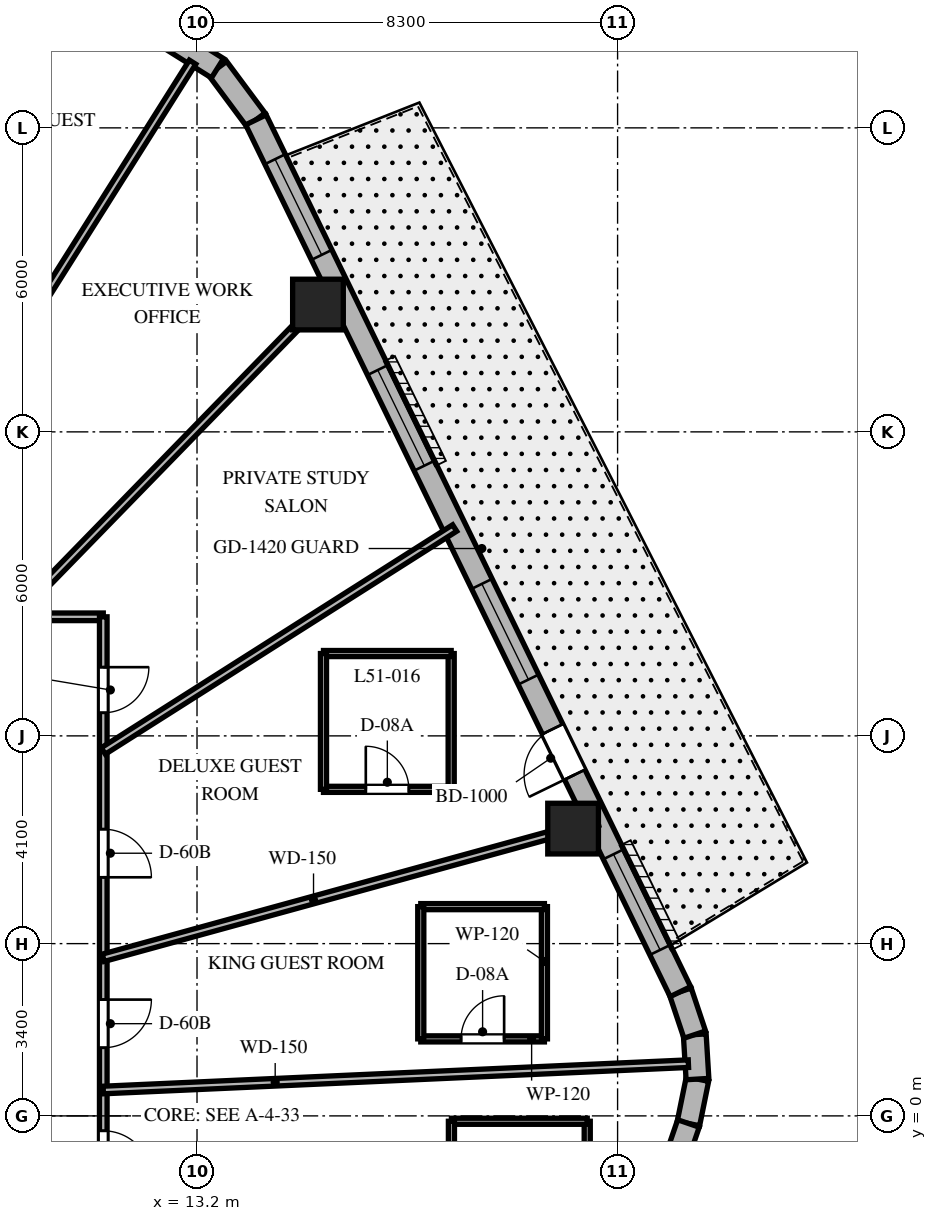
"""IFC4 building model, lengths in metres.
Left out: names, types, materials, properties, quantities, classifications, styles, units other than length and angle.
Written with IfcOpenShell. Run it as: python <this file> out.ifc"""

import sys

from ifc_helpers import new_model, si_unit, direction, frame, frame_2d, origin, origin_2d, place, context, subcontext, project, spatial, rectangle, extrude, element, fill, save


model = new_model("IFC4")
c1 = context("Model", 3, precision=1e-05, world=origin(), true_north=direction((0.0, 1.0)))
c2 = subcontext(c1, "Body", "Model", "MODEL_VIEW")
j1 = project(units=[si_unit("LENGTHUNIT", "METRE"), si_unit("PLANEANGLEUNIT", "RADIAN")], contexts=[c1])
p1 = place(None, origin())
s1 = spatial("IfcSite", under=j1, at=p1, CompositionType="ELEMENT")
p2 = place(p1, origin())
s2 = spatial("IfcBuilding", under=s1, at=p2, CompositionType="ELEMENT")
p3 = place(p2, frame((0.0, 0.0, 206.5)))
s3 = spatial("IfcBuildingStorey", under=s2, at=p3, CompositionType="ELEMENT", Elevation=206.5)
for number, where, z_axis, x_axis in (
    (1, (20.622, 5.67, 0.0), (0.0, 0.0, 1.0), (1.0, 0.0, 0.0)),
    (2, (15.587, 16.013, 0.0), (0.0, 0.0, 1.0), (1.0, 0.0, 0.0)),
):
    element("IfcColumn", number, at=place(p3, frame(where, z_axis=z_axis, x_axis=x_axis)), inside=s3, PredefinedType="COLUMN", context=c2, shape_type="SweptSolid", body=[
        extrude(rectangle(XDim=1.0, YDim=1.0, at=origin_2d()), origin(), (0.0, 0.0, 1.0), 3.8),
    ])
p4 = place(p3, frame((22.898, -0.15, 0.0), z_axis=(0.0, 0.0, 1.0), x_axis=(0.199055826889, 0.979988151858, 0.0)))
e3 = element("IfcWall", 3, at=p4, inside=s3, PredefinedType="SOLIDWALL", context=c2, shape_type="SweptSolid", body=[
    extrude(rectangle(XDim=0.894, YDim=0.45, at=frame_2d((0.447, 0.0))), origin(), (0.0, 0.0, 1.0), 3.5),
])
p5 = place(p3, frame((23.076, 0.727, 0.0), z_axis=(0.0, 0.0, 1.0), x_axis=(-0.060805222108, 0.998149650586, 0.0)))
e4 = element("IfcWall", 4, at=p5, inside=s3, PredefinedType="SOLIDWALL", context=c2, shape_type="SweptSolid", body=[
    extrude(rectangle(XDim=0.879, YDim=0.45, at=frame_2d((0.44, 0.0))), origin(), (0.0, 0.0, 1.0), 3.5),
])
p6 = place(p3, frame((23.023, 1.604, 0.0), z_axis=(0.0, 0.0, 1.0), x_axis=(-0.316801227695, 0.948491951537, 0.0)))
e5 = element("IfcWall", 5, at=p6, inside=s3, PredefinedType="SOLIDWALL", context=c2, shape_type="SweptSolid", body=[
    extrude(rectangle(XDim=0.894, YDim=0.45, at=frame_2d((0.447, 0.0))), origin(), (0.0, 0.0, 1.0), 3.5),
])
p7 = place(p3, frame((14.362, 19.658, 0.0), z_axis=(0.0, 0.0, 1.0), x_axis=(-0.596642462792, 0.80250717853, 0.0)))
e6 = element("IfcWall", 6, at=p7, inside=s3, PredefinedType="SOLIDWALL", context=c2, shape_type="SweptSolid", body=[
    extrude(rectangle(XDim=1.27, YDim=0.45, at=frame_2d((0.635, 0.0))), origin(), (0.0, 0.0, 1.0), 3.5),
])
p8 = place(p3, frame((13.604, 20.678, 0.0), z_axis=(0.0, 0.0, 1.0), x_axis=(-0.847910404124, 0.53013955387, 0.0)))
e7 = element("IfcWall", 7, at=p8, inside=s3, PredefinedType="SOLIDWALL", context=c2, shape_type="SweptSolid", body=[
    extrude(rectangle(XDim=1.249, YDim=0.45, at=frame_2d((0.624, 0.0))), origin(), (0.0, 0.0, 1.0), 3.5),
])
p9 = place(p3, frame((16.324, -19.275, 0.0), z_axis=(0.0, 0.0, 1.0), x_axis=(0.325083142304, 0.945685439557, 0.0)))
e8 = element("IfcWall", 8, at=p9, inside=s3, PredefinedType="SOLIDWALL", context=c2, shape_type="SweptSolid", body=[
    extrude(rectangle(XDim=20.224, YDim=0.45, at=frame_2d((10.112, 0.0))), origin(), (0.0, 0.0, 1.0), 3.5),
])
p10 = place(p9, frame((5.062, 0.0, 0.0)))
e9 = element("IfcOpeningElement", 9, at=p10, cuts=e8, PredefinedType="OPENING", context=c2, shape_type="SweptSolid", body=[
    extrude(rectangle(XDim=0.95, YDim=2.15, at=frame_2d((0.475, 1.075))), frame((0.0, 0.235, 0.0), z_axis=(0.0, -1.0, 0.0), x_axis=(1.0, 0.0, 0.0)), (0.0, 0.0, 1.0), 0.47),
])
p11 = place(p9, frame((1.253, 0.0, 0.8)))
e10 = element("IfcOpeningElement", 10, at=p11, cuts=e8, PredefinedType="OPENING", context=c2, shape_type="SweptSolid", body=[
    extrude(rectangle(XDim=1.5, YDim=1.8, at=frame_2d((0.75, 0.9))), frame((0.0, 0.235, 0.0), z_axis=(0.0, -1.0, 0.0), x_axis=(1.0, 0.0, 0.0)), (0.0, 0.0, 1.0), 0.47),
])
p12 = place(p9, frame((9.309, 0.0, 0.8)))
e11 = element("IfcOpeningElement", 11, at=p12, cuts=e8, PredefinedType="OPENING", context=c2, shape_type="SweptSolid", body=[
    extrude(rectangle(XDim=1.5, YDim=1.8, at=frame_2d((0.75, 0.9))), frame((0.0, 0.235, 0.0), z_axis=(0.0, -1.0, 0.0), x_axis=(1.0, 0.0, 0.0)), (0.0, 0.0, 1.0), 0.47),
])
p13 = place(p9, frame((17.418, 0.0, 0.8)))
e12 = element("IfcOpeningElement", 12, at=p13, cuts=e8, PredefinedType="OPENING", context=c2, shape_type="SweptSolid", body=[
    extrude(rectangle(XDim=1.5, YDim=1.8, at=frame_2d((0.75, 0.9))), frame((0.0, 0.235, 0.0), z_axis=(0.0, -1.0, 0.0), x_axis=(1.0, 0.0, 0.0)), (0.0, 0.0, 1.0), 0.47),
])
p14 = place(p3, frame((22.74, 2.452, 0.0), z_axis=(0.0, 0.0, 1.0), x_axis=(-0.437753424814, 0.899095066755, 0.0)))
e13 = element("IfcWall", 13, at=p14, inside=s3, PredefinedType="SOLIDWALL", context=c2, shape_type="SweptSolid", body=[
    extrude(rectangle(XDim=19.137, YDim=0.45, at=frame_2d((9.569, 0.0))), origin(), (0.0, 0.0, 1.0), 3.5),
])
p15 = place(p14, frame((4.763, 0.0, 0.0)))
e14 = element("IfcOpeningElement", 14, at=p15, cuts=e13, PredefinedType="OPENING", context=c2, shape_type="SweptSolid", body=[
    extrude(rectangle(XDim=1.0, YDim=2.15, at=frame_2d((0.5, 1.075))), frame((0.0, 0.235, 0.0), z_axis=(0.0, -1.0, 0.0), x_axis=(1.0, 0.0, 0.0)), (0.0, 0.0, 1.0), 0.47),
])
p16 = place(p14, frame((0.916, 0.0, 0.8)))
e15 = element("IfcOpeningElement", 15, at=p16, cuts=e13, PredefinedType="OPENING", context=c2, shape_type="SweptSolid", body=[
    extrude(rectangle(XDim=2.1, YDim=1.85, at=frame_2d((1.05, 0.925))), frame((0.0, 0.235, 0.0), z_axis=(0.0, -1.0, 0.0), x_axis=(1.0, 0.0, 0.0)), (0.0, 0.0, 1.0), 0.47),
])
p17 = place(p14, frame((6.851, 0.0, 0.8)))
e16 = element("IfcOpeningElement", 16, at=p17, cuts=e13, PredefinedType="OPENING", context=c2, shape_type="SweptSolid", body=[
    extrude(rectangle(XDim=2.1, YDim=1.85, at=frame_2d((1.05, 0.925))), frame((0.0, 0.235, 0.0), z_axis=(0.0, -1.0, 0.0), x_axis=(1.0, 0.0, 0.0)), (0.0, 0.0, 1.0), 0.47),
])
p18 = place(p14, frame((11.545, 0.0, 0.8)))
e17 = element("IfcOpeningElement", 17, at=p18, cuts=e13, PredefinedType="OPENING", context=c2, shape_type="SweptSolid", body=[
    extrude(rectangle(XDim=2.1, YDim=1.85, at=frame_2d((1.05, 0.925))), frame((0.0, 0.235, 0.0), z_axis=(0.0, -1.0, 0.0), x_axis=(1.0, 0.0, 0.0)), (0.0, 0.0, 1.0), 0.47),
])
p19 = place(p14, frame((16.173, 0.0, 0.8)))
e18 = element("IfcOpeningElement", 18, at=p19, cuts=e13, PredefinedType="OPENING", context=c2, shape_type="SweptSolid", body=[
    extrude(rectangle(XDim=2.1, YDim=1.85, at=frame_2d((1.05, 0.925))), frame((0.0, 0.235, 0.0), z_axis=(0.0, -1.0, 0.0), x_axis=(1.0, 0.0, 0.0)), (0.0, 0.0, 1.0), 0.47),
])
p20 = place(p3, frame((0.92, 9.85, 0.0), z_axis=(0.0, 0.0, 1.0), x_axis=(1.0, 0.0, 0.0)))
e19 = element("IfcWall", 19, at=p20, inside=s3, PredefinedType="PARTITIONING", context=c2, shape_type="SweptSolid", body=[
    extrude(rectangle(XDim=10.43, YDim=0.15, at=frame_2d((5.215, 0.0))), origin(), (0.0, 0.0, 1.0), 2.99),
])
p21 = place(p20, frame((6.577, 0.0, 0.0)))
e20 = element("IfcOpeningElement", 20, at=p21, cuts=e19, PredefinedType="OPENING", context=c2, shape_type="SweptSolid", body=[
    extrude(rectangle(XDim=0.9, YDim=2.03, at=frame_2d((0.45, 1.015))), frame((0.0, 0.085, 0.0), z_axis=(0.0, -1.0, 0.0), x_axis=(1.0, 0.0, 0.0)), (0.0, 0.0, 1.0), 0.17),
])
p22 = place(p20, frame((3.234, 0.0, 0.0)))
e21 = element("IfcOpeningElement", 21, at=p22, cuts=e19, PredefinedType="OPENING", context=c2, shape_type="SweptSolid", body=[
    extrude(rectangle(XDim=0.95, YDim=2.03, at=frame_2d((0.475, 1.015))), frame((0.0, 0.085, 0.0), z_axis=(0.0, -1.0, 0.0), x_axis=(1.0, 0.0, 0.0)), (0.0, 0.0, 1.0), 0.17),
])
p23 = place(p3, frame((11.35, 9.85, 0.0), z_axis=(0.0, 0.0, 1.0), x_axis=(0.0, -1.0, 0.0)))
e22 = element("IfcWall", 22, at=p23, inside=s3, PredefinedType="PARTITIONING", context=c2, shape_type="SweptSolid", body=[
    extrude(rectangle(XDim=12.4, YDim=0.15, at=frame_2d((6.2, 0.0))), origin(), (0.0, 0.0, 1.0), 2.99),
])
p24 = place(p23, frame((7.555, 0.0, 0.0)))
e23 = element("IfcOpeningElement", 23, at=p24, cuts=e22, PredefinedType="OPENING", context=c2, shape_type="SweptSolid", body=[
    extrude(rectangle(XDim=0.95, YDim=2.03, at=frame_2d((0.475, 1.015))), frame((0.0, 0.085, 0.0), z_axis=(0.0, -1.0, 0.0), x_axis=(1.0, 0.0, 0.0)), (0.0, 0.0, 1.0), 0.17),
])
p25 = place(p23, frame((4.191, 0.0, 0.0)))
e24 = element("IfcOpeningElement", 24, at=p25, cuts=e22, PredefinedType="OPENING", context=c2, shape_type="SweptSolid", body=[
    extrude(rectangle(XDim=0.95, YDim=2.03, at=frame_2d((0.475, 1.015))), frame((0.0, 0.085, 0.0), z_axis=(0.0, -1.0, 0.0), x_axis=(1.0, 0.0, 0.0)), (0.0, 0.0, 1.0), 0.17),
])
p26 = place(p23, frame((0.994, 0.0, 0.0)))
e25 = element("IfcOpeningElement", 25, at=p26, cuts=e22, PredefinedType="OPENING", context=c2, shape_type="SweptSolid", body=[
    extrude(rectangle(XDim=0.9, YDim=2.03, at=frame_2d((0.45, 1.015))), frame((0.0, 0.085, 0.0), z_axis=(0.0, -1.0, 0.0), x_axis=(1.0, 0.0, 0.0)), (0.0, 0.0, 1.0), 0.17),
])
p27 = place(p23, frame((10.144, 0.0, 0.0)))
e26 = element("IfcOpeningElement", 26, at=p27, cuts=e22, PredefinedType="OPENING", context=c2, shape_type="SweptSolid", body=[
    extrude(rectangle(XDim=0.95, YDim=2.03, at=frame_2d((0.475, 1.015))), frame((0.0, 0.085, 0.0), z_axis=(0.0, -1.0, 0.0), x_axis=(1.0, 0.0, 0.0)), (0.0, 0.0, 1.0), 0.17),
])
p28 = place(p3, frame((11.35, 0.511, 0.0), z_axis=(0.0, 0.0, 1.0), x_axis=(0.998988518139, 0.044965994104, 0.0)))
e27 = element("IfcWall", 27, at=p28, inside=s3, PredefinedType="PARTITIONING", context=c2, shape_type="SweptSolid", body=[
    extrude(rectangle(XDim=11.559, YDim=0.15, at=frame_2d((5.78, 0.0))), origin(), (0.0, 0.0, 1.0), 2.74),
])
p29 = place(p3, frame((11.35, 3.121, 0.0), z_axis=(0.0, 0.0, 1.0), x_axis=(0.964212793822, 0.265129568758, 0.0)))
e28 = element("IfcWall", 28, at=p29, inside=s3, PredefinedType="PARTITIONING", context=c2, shape_type="SweptSolid", body=[
    extrude(rectangle(XDim=10.12, YDim=0.15, at=frame_2d((5.06, 0.0))), origin(), (0.0, 0.0, 1.0), 2.74),
])
p30 = place(p3, frame((11.35, 7.202, 0.0), z_axis=(0.0, 0.0, 1.0), x_axis=(0.844364592263, 0.535769013039, 0.0)))
e29 = element("IfcWall", 29, at=p30, inside=s3, PredefinedType="PARTITIONING", context=c2, shape_type="SweptSolid", body=[
    extrude(rectangle(XDim=8.213, YDim=0.15, at=frame_2d((4.106, 0.0))), origin(), (0.0, 0.0, 1.0), 2.74),
])
p31 = place(p3, frame((9.588, 9.85, 0.0), z_axis=(0.0, 0.0, 1.0), x_axis=(0.697519469595, 0.716565830567, 0.0)))
e30 = element("IfcWall", 30, at=p31, inside=s3, PredefinedType="PARTITIONING", context=c2, shape_type="SweptSolid", body=[
    extrude(rectangle(XDim=9.126, YDim=0.15, at=frame_2d((4.563, 0.0))), origin(), (0.0, 0.0, 1.0), 2.74),
])
p32 = place(p3, frame((6.21, 9.85, 0.0), z_axis=(0.0, 0.0, 1.0), x_axis=(0.533335553786, 0.84590376939, 0.0)))
e31 = element("IfcWall", 31, at=p32, inside=s3, PredefinedType="PARTITIONING", context=c2, shape_type="SweptSolid", body=[
    extrude(rectangle(XDim=12.941, YDim=0.15, at=frame_2d((6.47, 0.0))), origin(), (0.0, 0.0, 1.0), 2.74),
])
p33 = place(p3, frame((17.616, 1.52, 0.0), z_axis=(0.0, 0.0, 1.0), x_axis=(1.0, 0.0, 0.0)))
e32 = element("IfcWall", 32, at=p33, inside=s3, PredefinedType="PARTITIONING", context=c2, shape_type="SweptSolid", body=[
    extrude(rectangle(XDim=2.44, YDim=0.12, at=frame_2d((1.22, 0.0))), origin(), (0.0, 0.0, 1.0), 3.5),
])
p34 = place(p33, frame((0.795, 0.0, 0.0)))
e33 = element("IfcOpeningElement", 33, at=p34, cuts=e32, PredefinedType="OPENING", context=c2, shape_type="SweptSolid", body=[
    extrude(rectangle(XDim=0.85, YDim=2.03, at=frame_2d((0.425, 1.015))), frame((0.0, 0.07, 0.0), z_axis=(0.0, -1.0, 0.0), x_axis=(1.0, 0.0, 0.0)), (0.0, 0.0, 1.0), 0.14),
])
p35 = place(p3, frame((20.056, 1.52, 0.0), z_axis=(0.0, 0.0, 1.0), x_axis=(0.0, 1.0, 0.0)))
e34 = element("IfcWall", 34, at=p35, inside=s3, PredefinedType="PARTITIONING", context=c2, shape_type="SweptSolid", body=[
    extrude(rectangle(XDim=2.61, YDim=0.12, at=frame_2d((1.305, 0.0))), origin(), (0.0, 0.0, 1.0), 3.5),
])
p36 = place(p3, frame((20.056, 4.13, 0.0), z_axis=(0.0, 0.0, 1.0), x_axis=(-1.0, 0.0, 0.0)))
e35 = element("IfcWall", 35, at=p36, inside=s3, PredefinedType="PARTITIONING", context=c2, shape_type="SweptSolid", body=[
    extrude(rectangle(XDim=2.44, YDim=0.12, at=frame_2d((1.22, 0.0))), origin(), (0.0, 0.0, 1.0), 3.5),
])
p37 = place(p3, frame((17.616, 4.13, 0.0), z_axis=(0.0, 0.0, 1.0), x_axis=(0.0, -1.0, 0.0)))
e36 = element("IfcWall", 36, at=p37, inside=s3, PredefinedType="PARTITIONING", context=c2, shape_type="SweptSolid", body=[
    extrude(rectangle(XDim=2.61, YDim=0.12, at=frame_2d((1.305, 0.0))), origin(), (0.0, 0.0, 1.0), 3.5),
])
p38 = place(p3, frame((15.696, 6.445, 0.0), z_axis=(0.0, 0.0, 1.0), x_axis=(1.0, 0.0, 0.0)))
e37 = element("IfcWall", 37, at=p38, inside=s3, PredefinedType="PARTITIONING", context=c2, shape_type="SweptSolid", body=[
    extrude(rectangle(XDim=2.52, YDim=0.12, at=frame_2d((1.26, 0.0))), origin(), (0.0, 0.0, 1.0), 2.99),
])
p39 = place(p38, frame((0.835, 0.0, 0.0)))
e38 = element("IfcOpeningElement", 38, at=p39, cuts=e37, PredefinedType="OPENING", context=c2, shape_type="SweptSolid", body=[
    extrude(rectangle(XDim=0.85, YDim=2.03, at=frame_2d((0.425, 1.015))), frame((0.0, 0.07, 0.0), z_axis=(0.0, -1.0, 0.0), x_axis=(1.0, 0.0, 0.0)), (0.0, 0.0, 1.0), 0.14),
])
p40 = place(p3, frame((18.216, 6.445, 0.0), z_axis=(0.0, 0.0, 1.0), x_axis=(0.0, 1.0, 0.0)))
e39 = element("IfcWall", 39, at=p40, inside=s3, PredefinedType="PARTITIONING", context=c2, shape_type="SweptSolid", body=[
    extrude(rectangle(XDim=2.68, YDim=0.12, at=frame_2d((1.34, 0.0))), origin(), (0.0, 0.0, 1.0), 3.5),
])
p41 = place(p3, frame((18.216, 9.125, 0.0), z_axis=(0.0, 0.0, 1.0), x_axis=(-1.0, 0.0, 0.0)))
e40 = element("IfcWall", 40, at=p41, inside=s3, PredefinedType="PARTITIONING", context=c2, shape_type="SweptSolid", body=[
    extrude(rectangle(XDim=2.52, YDim=0.12, at=frame_2d((1.26, 0.0))), origin(), (0.0, 0.0, 1.0), 3.5),
])
p42 = place(p3, frame((15.696, 9.125, 0.0), z_axis=(0.0, 0.0, 1.0), x_axis=(0.0, -1.0, 0.0)))
e41 = element("IfcWall", 41, at=p42, inside=s3, PredefinedType="PARTITIONING", context=c2, shape_type="SweptSolid", body=[
    extrude(rectangle(XDim=2.68, YDim=0.12, at=frame_2d((1.34, 0.0))), origin(), (0.0, 0.0, 1.0), 2.99),
])
p43 = place(p3, frame((20.901, -2.646, 0.0), z_axis=(0.0, 0.0, 1.0), x_axis=(0.0, 1.0, 0.0)))
e42 = element("IfcWall", 42, at=p43, inside=s3, PredefinedType="PARTITIONING", context=c2, shape_type="SweptSolid", body=[
    extrude(rectangle(XDim=2.54, YDim=0.12, at=frame_2d((1.27, 0.0))), origin(), (0.0, 0.0, 1.0), 2.74),
])
p44 = place(p3, frame((20.901, -0.106, 0.0), z_axis=(0.0, 0.0, 1.0), x_axis=(-1.0, 0.0, 0.0)))
e43 = element("IfcWall", 43, at=p44, inside=s3, PredefinedType="PARTITIONING", context=c2, shape_type="SweptSolid", body=[
    extrude(rectangle(XDim=2.68, YDim=0.12, at=frame_2d((1.34, 0.0))), origin(), (0.0, 0.0, 1.0), 2.74),
])
p45 = place(p3, frame((18.221, -0.106, 0.0), z_axis=(0.0, 0.0, 1.0), x_axis=(0.0, -1.0, 0.0)))
e44 = element("IfcWall", 44, at=p45, inside=s3, PredefinedType="PARTITIONING", context=c2, shape_type="SweptSolid", body=[
    extrude(rectangle(XDim=2.54, YDim=0.12, at=frame_2d((1.27, 0.0))), origin(), (0.0, 0.0, 1.0), 3.5),
])
p46 = place(p15, origin())
e45 = element("IfcDoor", 45, at=p46, inside=s3, OperationType="SINGLE_SWING_LEFT", PredefinedType="DOOR", context=c2, shape_type="SweptSolid", body=[
    extrude(rectangle(XDim=1.0, YDim=2.15, at=frame_2d((0.5, 1.075))), frame((0.0, 0.025, 0.0), z_axis=(0.0, -1.0, 0.0), x_axis=(1.0, 0.0, 0.0)), (0.0, 0.0, 1.0), 0.05),
])
fill(e14, e45)
p47 = place(p16, origin())
e46 = element("IfcWindow", 46, at=p47, inside=s3, PartitioningType="SINGLE_PANEL", PredefinedType="WINDOW", context=c2, shape_type="SweptSolid", body=[
    extrude(rectangle(XDim=2.1, YDim=1.85, at=frame_2d((1.05, 0.925))), frame((0.0, 0.03, 0.0), z_axis=(0.0, -1.0, 0.0), x_axis=(1.0, 0.0, 0.0)), (0.0, 0.0, 1.0), 0.06),
])
fill(e15, e46)
p48 = place(p17, origin())
e47 = element("IfcWindow", 47, at=p48, inside=s3, PartitioningType="SINGLE_PANEL", PredefinedType="WINDOW", context=c2, shape_type="SweptSolid", body=[
    extrude(rectangle(XDim=2.1, YDim=1.85, at=frame_2d((1.05, 0.925))), frame((0.0, 0.03, 0.0), z_axis=(0.0, -1.0, 0.0), x_axis=(1.0, 0.0, 0.0)), (0.0, 0.0, 1.0), 0.06),
])
fill(e16, e47)
p49 = place(p18, origin())
e48 = element("IfcWindow", 48, at=p49, inside=s3, PartitioningType="SINGLE_PANEL", PredefinedType="WINDOW", context=c2, shape_type="SweptSolid", body=[
    extrude(rectangle(XDim=2.1, YDim=1.85, at=frame_2d((1.05, 0.925))), frame((0.0, 0.03, 0.0), z_axis=(0.0, -1.0, 0.0), x_axis=(1.0, 0.0, 0.0)), (0.0, 0.0, 1.0), 0.06),
])
fill(e17, e48)
p50 = place(p19, origin())
e49 = element("IfcWindow", 49, at=p50, inside=s3, PartitioningType="SINGLE_PANEL", PredefinedType="WINDOW", context=c2, shape_type="SweptSolid", body=[
    extrude(rectangle(XDim=2.1, YDim=1.85, at=frame_2d((1.05, 0.925))), frame((0.0, 0.03, 0.0), z_axis=(0.0, -1.0, 0.0), x_axis=(1.0, 0.0, 0.0)), (0.0, 0.0, 1.0), 0.06),
])
fill(e18, e49)
p51 = place(p24, origin())
e50 = element("IfcDoor", 50, at=p51, inside=s3, OperationType="SINGLE_SWING_LEFT", PredefinedType="DOOR", context=c2, shape_type="SweptSolid", body=[
    extrude(rectangle(XDim=0.95, YDim=2.03, at=frame_2d((0.475, 1.015))), frame((0.0, 0.025, 0.0), z_axis=(0.0, -1.0, 0.0), x_axis=(1.0, 0.0, 0.0)), (0.0, 0.0, 1.0), 0.05),
])
fill(e23, e50)
p52 = place(p34, origin())
e51 = element("IfcDoor", 51, at=p52, inside=s3, OperationType="SINGLE_SWING_RIGHT", PredefinedType="DOOR", context=c2, shape_type="SweptSolid", body=[
    extrude(rectangle(XDim=0.85, YDim=2.03, at=frame_2d((0.425, 1.015))), frame((0.0, 0.025, 0.0), z_axis=(0.0, -1.0, 0.0), x_axis=(1.0, 0.0, 0.0)), (0.0, 0.0, 1.0), 0.05),
])
fill(e33, e51)
p53 = place(p25, origin())
e52 = element("IfcDoor", 52, at=p53, inside=s3, OperationType="SINGLE_SWING_RIGHT", PredefinedType="DOOR", context=c2, shape_type="SweptSolid", body=[
    extrude(rectangle(XDim=0.95, YDim=2.03, at=frame_2d((0.475, 1.015))), frame((0.0, 0.025, 0.0), z_axis=(0.0, -1.0, 0.0), x_axis=(1.0, 0.0, 0.0)), (0.0, 0.0, 1.0), 0.05),
])
fill(e24, e52)
p54 = place(p39, origin())
e53 = element("IfcDoor", 53, at=p54, inside=s3, OperationType="SINGLE_SWING_LEFT", PredefinedType="DOOR", context=c2, shape_type="SweptSolid", body=[
    extrude(rectangle(XDim=0.85, YDim=2.03, at=frame_2d((0.425, 1.015))), frame((0.0, 0.025, 0.0), z_axis=(0.0, -1.0, 0.0), x_axis=(1.0, 0.0, 0.0)), (0.0, 0.0, 1.0), 0.05),
])
fill(e38, e53)
p55 = place(p26, origin())
e54 = element("IfcDoor", 54, at=p55, inside=s3, OperationType="SINGLE_SWING_LEFT", PredefinedType="DOOR", context=c2, shape_type="SweptSolid", body=[
    extrude(rectangle(XDim=0.9, YDim=2.03, at=frame_2d((0.45, 1.015))), frame((0.0, 0.025, 0.0), z_axis=(0.0, -1.0, 0.0), x_axis=(1.0, 0.0, 0.0)), (0.0, 0.0, 1.0), 0.05),
])
fill(e25, e54)
p56 = place(p27, origin())
e55 = element("IfcDoor", 55, at=p56, inside=s3, OperationType="SINGLE_SWING_RIGHT", PredefinedType="DOOR", context=c2, shape_type="SweptSolid", body=[
    extrude(rectangle(XDim=0.95, YDim=2.03, at=frame_2d((0.475, 1.015))), frame((0.0, 0.025, 0.0), z_axis=(0.0, -1.0, 0.0), x_axis=(1.0, 0.0, 0.0)), (0.0, 0.0, 1.0), 0.05),
])
fill(e26, e55)
save(model, sys.argv[1])
